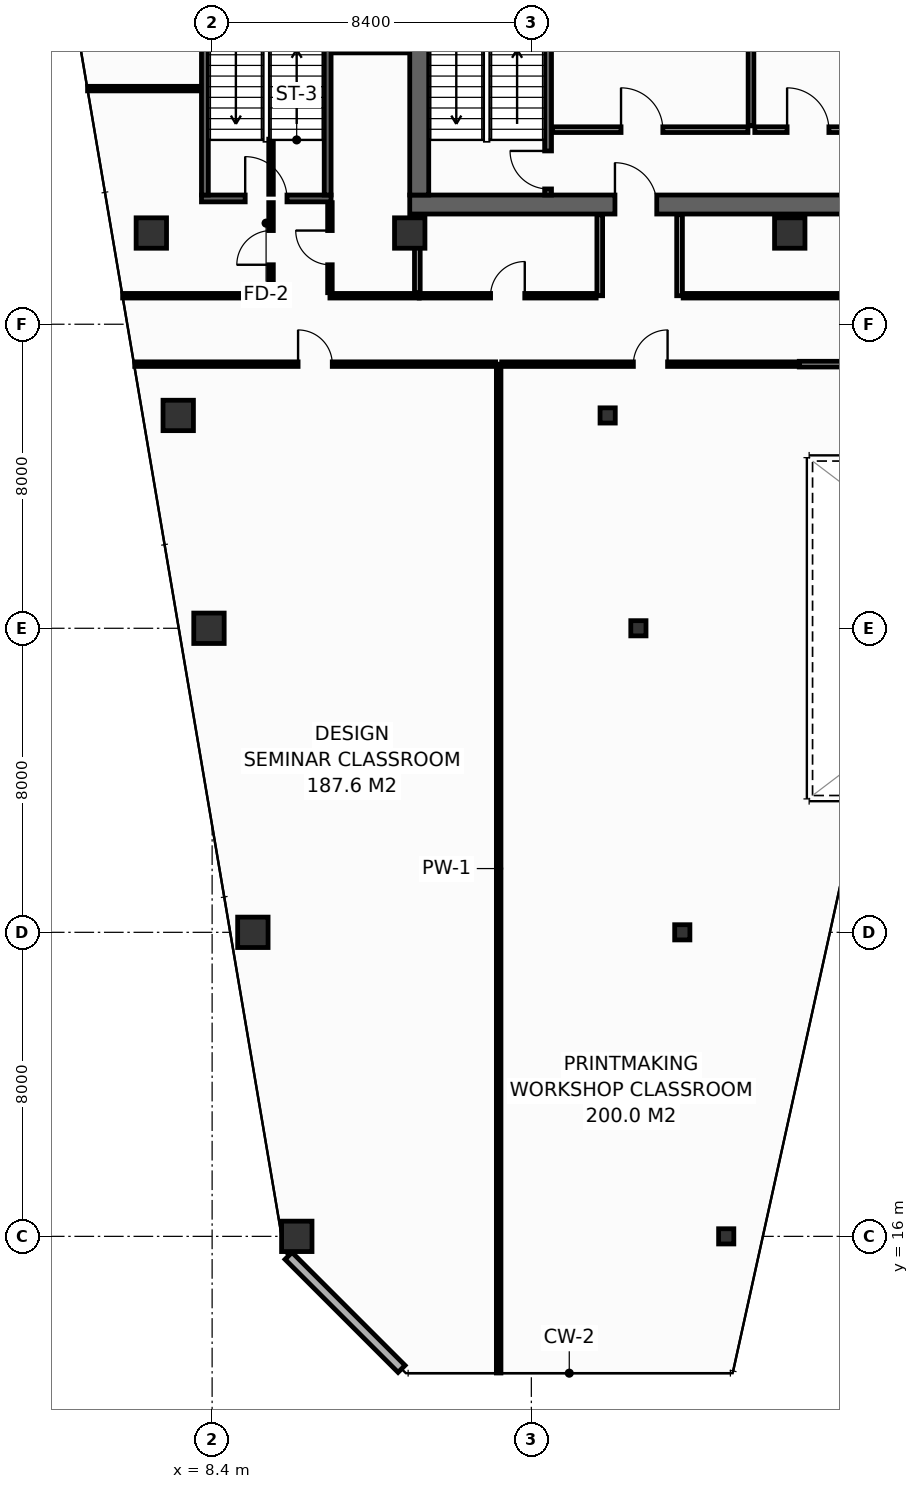
"""IFC4 building model, lengths in metres.
Left out: names, types, materials, properties, quantities, classifications, styles, units other than length and angle.
Written with IfcOpenShell. Run it as: python <this file> out.ifc"""

import sys

from ifc_helpers import new_model, si_unit, direction, frame, frame_2d, origin, origin_2d, place, context, subcontext, project, spatial, rectangle, hollow_rectangle, extrude, element, fill, save


model = new_model("IFC4")
c1 = context("Model", 3, precision=1e-05, world=origin(), true_north=direction((0.0, 1.0)))
c2 = subcontext(c1, "Body", "Model", "MODEL_VIEW")
j1 = project(units=[si_unit("LENGTHUNIT", "METRE"), si_unit("PLANEANGLEUNIT", "RADIAN")], contexts=[c1])
p1 = place(None, origin())
s1 = spatial("IfcSite", under=j1, at=p1, CompositionType="ELEMENT")
p2 = place(p1, origin())
s2 = spatial("IfcBuilding", under=s1, at=p2, CompositionType="ELEMENT")
p3 = place(p2, frame((0.0, 0.0, 217.0)))
s3 = spatial("IfcBuildingStorey", under=s2, at=p3, CompositionType="ELEMENT", Elevation=217.0)
p4 = place(p3, frame((13.6, 43.15, 0.0), z_axis=(0.0, 0.0, 1.0), x_axis=(1.0, 0.0, 0.0)))
e1 = element("IfcWall", 1, at=p4, inside=s3, PredefinedType="SHEAR", context=c2, shape_type="SweptSolid", body=[
    extrude(rectangle(XDim=32.7, YDim=0.5, at=frame_2d((16.35, 0.0))), origin(), (0.0, 0.0, 1.0), 3.55),
])
p5 = place(p4, frame((5.4, 0.0, 0.0)))
e2 = element("IfcOpeningElement", 2, at=p5, cuts=e1, PredefinedType="OPENING", context=c2, shape_type="SweptSolid", body=[
    extrude(rectangle(XDim=1.1, YDim=2.15, at=frame_2d((0.55, 1.075))), frame((0.0, 0.26, 0.0), z_axis=(0.0, -1.0, 0.0), x_axis=(1.0, 0.0, 0.0)), (0.0, 0.0, 1.0), 0.52),
])
p6 = place(p4, frame((25.6, 0.0, 0.0)))
e3 = element("IfcOpeningElement", 3, at=p6, cuts=e1, PredefinedType="OPENING", context=c2, shape_type="SweptSolid", body=[
    extrude(rectangle(XDim=1.1, YDim=2.15, at=frame_2d((0.55, 1.075))), frame((0.0, 0.26, 0.0), z_axis=(0.0, -1.0, 0.0), x_axis=(1.0, 0.0, 0.0)), (0.0, 0.0, 1.0), 0.52),
])
p7 = place(p3, frame((13.85, 43.4, 0.0), z_axis=(0.0, 0.0, 1.0), x_axis=(0.0, 1.0, 0.0)))
e4 = element("IfcWall", 4, at=p7, inside=s3, PredefinedType="SHEAR", context=c2, shape_type="SweptSolid", body=[
    extrude(rectangle(XDim=10.4, YDim=0.5, at=frame_2d((5.2, 0.0))), origin(), (0.0, 0.0, 1.0), 3.55),
])
for number, where, z_axis, x_axis in (
    (5, (6.8, 42.4, 0.0), (0.0, 0.0, 1.0), (1.0, 0.0, 0.0)),
    (6, (13.6, 42.4, 0.0), (0.0, 0.0, 1.0), (1.0, 0.0, 0.0)),
    (7, (23.6, 42.4, 0.0), (0.0, 0.0, 1.0), (1.0, 0.0, 0.0)),
    (8, (10.628, 16.0, 0.0), (0.0, 0.0, 1.0), (1.0, 0.0, 0.0)),
):
    element("IfcColumn", number, at=place(p3, frame(where, z_axis=z_axis, x_axis=x_axis)), inside=s3, PredefinedType="COLUMN", context=c2, shape_type="SweptSolid", body=[
        extrude(hollow_rectangle(XDim=0.8, YDim=0.8, WallThickness=0.036, at=origin_2d()), origin(), (0.0, 0.0, 1.0), 3.8),
    ])
p8 = place(p3, frame((21.928, 16.0, 0.0), z_axis=(0.0, 0.0, 1.0), x_axis=(1.0, 0.0, 0.0)))
e9 = element("IfcColumn", 9, at=p8, inside=s3, PredefinedType="COLUMN", context=c2, shape_type="SweptSolid", body=[
    extrude(hollow_rectangle(XDim=0.4, YDim=0.4, WallThickness=0.016, at=origin_2d()), origin(), (0.0, 0.0, 1.0), 3.8),
])
p9 = place(p3, frame((9.472, 24.0, 0.0), z_axis=(0.0, 0.0, 1.0), x_axis=(1.0, 0.0, 0.0)))
e10 = element("IfcColumn", 10, at=p9, inside=s3, PredefinedType="COLUMN", context=c2, shape_type="SweptSolid", body=[
    extrude(hollow_rectangle(XDim=0.8, YDim=0.8, WallThickness=0.036, at=origin_2d()), origin(), (0.0, 0.0, 1.0), 3.8),
])
p10 = place(p3, frame((20.772, 24.0, 0.0), z_axis=(0.0, 0.0, 1.0), x_axis=(1.0, 0.0, 0.0)))
e11 = element("IfcColumn", 11, at=p10, inside=s3, PredefinedType="COLUMN", context=c2, shape_type="SweptSolid", body=[
    extrude(hollow_rectangle(XDim=0.4, YDim=0.4, WallThickness=0.016, at=origin_2d()), origin(), (0.0, 0.0, 1.0), 3.8),
])
p11 = place(p3, frame((8.317, 32.0, 0.0), z_axis=(0.0, 0.0, 1.0), x_axis=(1.0, 0.0, 0.0)))
e12 = element("IfcColumn", 12, at=p11, inside=s3, PredefinedType="COLUMN", context=c2, shape_type="SweptSolid", body=[
    extrude(hollow_rectangle(XDim=0.8, YDim=0.8, WallThickness=0.036, at=origin_2d()), origin(), (0.0, 0.0, 1.0), 3.8),
])
p12 = place(p3, frame((19.617, 32.0, 0.0), z_axis=(0.0, 0.0, 1.0), x_axis=(1.0, 0.0, 0.0)))
e13 = element("IfcColumn", 13, at=p12, inside=s3, PredefinedType="COLUMN", context=c2, shape_type="SweptSolid", body=[
    extrude(hollow_rectangle(XDim=0.4, YDim=0.4, WallThickness=0.016, at=origin_2d()), origin(), (0.0, 0.0, 1.0), 3.8),
])
p13 = place(p3, frame((7.508, 37.6, 0.0), z_axis=(0.0, 0.0, 1.0), x_axis=(1.0, 0.0, 0.0)))
e14 = element("IfcColumn", 14, at=p13, inside=s3, PredefinedType="COLUMN", context=c2, shape_type="SweptSolid", body=[
    extrude(hollow_rectangle(XDim=0.8, YDim=0.8, WallThickness=0.036, at=origin_2d()), origin(), (0.0, 0.0, 1.0), 3.8),
])
p14 = place(p3, frame((18.808, 37.6, 0.0), z_axis=(0.0, 0.0, 1.0), x_axis=(1.0, 0.0, 0.0)))
e15 = element("IfcColumn", 15, at=p14, inside=s3, PredefinedType="COLUMN", context=c2, shape_type="SweptSolid", body=[
    extrude(hollow_rectangle(XDim=0.4, YDim=0.4, WallThickness=0.016, at=origin_2d()), origin(), (0.0, 0.0, 1.0), 3.8),
])
p15 = place(p3, frame((17.24, 43.4, 0.0), z_axis=(0.0, 0.0, 1.0), x_axis=(0.0, 1.0, 0.0)))
e16 = element("IfcWall", 16, at=p15, inside=s3, PredefinedType="SHEAR", context=c2, shape_type="SweptSolid", body=[
    extrude(rectangle(XDim=10.4, YDim=0.18, at=frame_2d((5.2, 0.0))), origin(), (0.0, 0.0, 1.0), 3.55),
])
p16 = place(p15, frame((0.16, 0.0, 0.0)))
e17 = element("IfcOpeningElement", 17, at=p16, cuts=e16, PredefinedType="OPENING", context=c2, shape_type="SweptSolid", body=[
    extrude(rectangle(XDim=1.0, YDim=2.15, at=frame_2d((0.5, 1.075))), frame((0.0, 0.1, 0.0), z_axis=(0.0, -1.0, 0.0), x_axis=(1.0, 0.0, 0.0)), (0.0, 0.0, 1.0), 0.2),
])
p17 = place(p3, frame((8.12, 43.31, 0.0), z_axis=(0.0, 0.0, 1.0), x_axis=(1.0, 0.0, 0.0)))
e18 = element("IfcWall", 18, at=p17, inside=s3, PredefinedType="SHEAR", context=c2, shape_type="SweptSolid", body=[
    extrude(rectangle(XDim=3.41, YDim=0.18, at=frame_2d((1.705, 0.0))), origin(), (0.0, 0.0, 1.0), 3.55),
])
p18 = place(p17, frame((1.15, 0.0, 0.0)))
e19 = element("IfcOpeningElement", 19, at=p18, cuts=e18, PredefinedType="OPENING", context=c2, shape_type="SweptSolid", body=[
    extrude(rectangle(XDim=1.1, YDim=2.15, at=frame_2d((0.55, 1.075))), frame((0.0, 0.1, 0.0), z_axis=(0.0, -1.0, 0.0), x_axis=(1.0, 0.0, 0.0)), (0.0, 0.0, 1.0), 0.2),
])
for number, where, z_axis, x_axis in (
    (20, (11.44, 43.4, 0.0), (0.0, 0.0, 1.0), (0.0, 1.0, 0.0)),
    (21, (8.21, 53.8, 0.0), (0.0, 0.0, 1.0), (0.0, -1.0, 0.0)),
):
    element("IfcWall", number, at=place(p3, frame(where, z_axis=z_axis, x_axis=x_axis)), inside=s3, PredefinedType="SHEAR", context=c2, shape_type="SweptSolid", body=[
        extrude(rectangle(XDim=10.4, YDim=0.18, at=frame_2d((5.2, 0.0))), origin(), (0.0, 0.0, 1.0), 3.55),
    ])
p19 = place(p3, frame((17.36, 45.12, 0.0), z_axis=(0.0, 0.0, 1.0), x_axis=(1.0, 0.0, 0.0)))
e22 = element("IfcWall", 22, at=p19, inside=s3, PredefinedType="PARTITIONING", context=c2, shape_type="SweptSolid", body=[
    extrude(rectangle(XDim=5.14, YDim=0.15, at=frame_2d((2.57, 0.0))), origin(), (0.0, 0.0, 1.0), 3.55),
])
p20 = place(p19, frame((1.8, 0.0, 0.0)))
e23 = element("IfcOpeningElement", 23, at=p20, cuts=e22, PredefinedType="OPENING", context=c2, shape_type="SweptSolid", body=[
    extrude(rectangle(XDim=1.1, YDim=2.15, at=frame_2d((0.55, 1.075))), frame((0.0, 0.085, 0.0), z_axis=(0.0, -1.0, 0.0), x_axis=(1.0, 0.0, 0.0)), (0.0, 0.0, 1.0), 0.17),
])
p21 = place(p3, frame((22.58, 50.55, 0.0), z_axis=(0.0, 0.0, 1.0), x_axis=(0.0, -1.0, 0.0)))
e24 = element("IfcWall", 24, at=p21, inside=s3, PredefinedType="PARTITIONING", context=c2, shape_type="SweptSolid", body=[
    extrude(rectangle(XDim=5.33, YDim=0.15, at=frame_2d((2.665, 0.0))), origin(), (0.0, 0.0, 1.0), 3.55),
])
p22 = place(p21, frame((1.8, 0.0, 0.0)))
e25 = element("IfcOpeningElement", 25, at=p22, cuts=e24, PredefinedType="OPENING", context=c2, shape_type="SweptSolid", body=[
    extrude(rectangle(XDim=1.1, YDim=2.15, at=frame_2d((0.55, 1.075))), frame((0.0, 0.085, 0.0), z_axis=(0.0, -1.0, 0.0), x_axis=(1.0, 0.0, 0.0)), (0.0, 0.0, 1.0), 0.17),
])
p23 = place(p3, frame((22.68, 45.12, 0.0), z_axis=(0.0, 0.0, 1.0), x_axis=(1.0, 0.0, 0.0)))
e26 = element("IfcWall", 26, at=p23, inside=s3, PredefinedType="PARTITIONING", context=c2, shape_type="SweptSolid", body=[
    extrude(rectangle(XDim=2.92, YDim=0.15, at=frame_2d((1.46, 0.0))), origin(), (0.0, 0.0, 1.0), 3.55),
])
p24 = place(p23, frame((0.85, 0.0, 0.0)))
e27 = element("IfcOpeningElement", 27, at=p24, cuts=e26, PredefinedType="OPENING", context=c2, shape_type="SweptSolid", body=[
    extrude(rectangle(XDim=1.1, YDim=2.15, at=frame_2d((0.55, 1.075))), frame((0.0, 0.085, 0.0), z_axis=(0.0, -1.0, 0.0), x_axis=(1.0, 0.0, 0.0)), (0.0, 0.0, 1.0), 0.17),
])
p25 = place(p3, frame((10.411, 15.487, 0.0), z_axis=(0.0, 0.0, 1.0), x_axis=(0.707135806771, -0.70707775441, 0.0)))
e28 = element("IfcWall", 28, at=p25, inside=s3, PredefinedType="STANDARD", context=c2, shape_type="SweptSolid", body=[
    extrude(rectangle(XDim=4.206, YDim=0.26, at=frame_2d((2.103, 0.0))), origin(), (0.0, 0.0, 1.0), 3.55),
])
p26 = place(p3, frame((6.045, 40.75, 0.0), z_axis=(0.0, 0.0, 1.0), x_axis=(1.0, 0.0, 0.0)))
e29 = element("IfcWall", 29, at=p26, inside=s3, PredefinedType="PARTITIONING", context=c2, shape_type="SweptSolid", body=[
    extrude(rectangle(XDim=3.905, YDim=0.12, at=frame_2d((1.952, 0.0))), origin(), (0.0, 0.0, 1.0), 3.035),
])
p27 = place(p3, frame((11.5, 40.75, 0.0), z_axis=(0.0, 0.0, 1.0), x_axis=(1.0, 0.0, 0.0)))
e30 = element("IfcWall", 30, at=p27, inside=s3, PredefinedType="PARTITIONING", context=c2, shape_type="SweptSolid", body=[
    extrude(rectangle(XDim=2.35, YDim=0.12, at=frame_2d((1.175, 0.0))), origin(), (0.0, 0.0, 1.0), 3.55),
])
p28 = place(p3, frame((5.122, 46.2, 0.0), z_axis=(0.0, 0.0, 1.0), x_axis=(1.0, 0.0, 0.0)))
e31 = element("IfcWall", 31, at=p28, inside=s3, PredefinedType="PARTITIONING", context=c2, shape_type="SweptSolid", body=[
    extrude(rectangle(XDim=2.978, YDim=0.12, at=frame_2d((1.489, 0.0))), origin(), (0.0, 0.0, 1.0), 2.835),
])
p29 = place(p3, frame((9.95, 40.83, 0.0), z_axis=(0.0, 0.0, 1.0), x_axis=(0.0, 1.0, 0.0)))
e32 = element("IfcWall", 32, at=p29, inside=s3, PredefinedType="PARTITIONING", context=c2, shape_type="SweptSolid", body=[
    extrude(rectangle(XDim=2.37, YDim=0.12, at=frame_2d((1.185, 0.0))), origin(), (0.0, 0.0, 1.0), 2.835),
])
p30 = place(p29, frame((0.735, 0.0, 0.0)))
e33 = element("IfcOpeningElement", 33, at=p30, cuts=e32, PredefinedType="OPENING", context=c2, shape_type="SweptSolid", body=[
    extrude(rectangle(XDim=0.9, YDim=2.1, at=frame_2d((0.45, 1.05))), frame((0.0, 0.07, 0.0), z_axis=(0.0, -1.0, 0.0), x_axis=(1.0, 0.0, 0.0)), (0.0, 0.0, 1.0), 0.14),
])
p31 = place(p3, frame((9.95, 43.42, 0.0), z_axis=(0.0, 0.0, 1.0), x_axis=(0.0, 1.0, 0.0)))
e34 = element("IfcWall", 34, at=p31, inside=s3, PredefinedType="PARTITIONING", context=c2, shape_type="SweptSolid", body=[
    extrude(rectangle(XDim=1.45, YDim=0.12, at=frame_2d((0.725, 0.0))), origin(), (0.0, 0.0, 1.0), 3.55),
])
p32 = place(p3, frame((11.55, 47.2, 0.0), z_axis=(0.0, 0.0, 1.0), x_axis=(1.0, 0.0, 0.0)))
e35 = element("IfcWall", 35, at=p32, inside=s3, PredefinedType="PARTITIONING", context=c2, shape_type="SweptSolid", body=[
    extrude(rectangle(XDim=2.03, YDim=0.12, at=frame_2d((1.015, 0.0))), origin(), (0.0, 0.0, 1.0), 3.55),
])
p33 = place(p3, frame((11.5, 40.83, 0.0), z_axis=(0.0, 0.0, 1.0), x_axis=(0.0, 1.0, 0.0)))
e36 = element("IfcWall", 36, at=p33, inside=s3, PredefinedType="PARTITIONING", context=c2, shape_type="SweptSolid", body=[
    extrude(rectangle(XDim=2.37, YDim=0.12, at=frame_2d((1.185, 0.0))), origin(), (0.0, 0.0, 1.0), 2.835),
])
p34 = place(p33, frame((0.735, 0.0, 0.0)))
e37 = element("IfcOpeningElement", 37, at=p34, cuts=e36, PredefinedType="OPENING", context=c2, shape_type="SweptSolid", body=[
    extrude(rectangle(XDim=0.9, YDim=2.1, at=frame_2d((0.45, 1.05))), frame((0.0, 0.07, 0.0), z_axis=(0.0, -1.0, 0.0), x_axis=(1.0, 0.0, 0.0)), (0.0, 0.0, 1.0), 0.14),
])
p35 = place(p3, frame((13.8, 40.83, 0.0), z_axis=(0.0, 0.0, 1.0), x_axis=(0.0, 1.0, 0.0)))
e38 = element("IfcWall", 38, at=p35, inside=s3, PredefinedType="PARTITIONING", context=c2, shape_type="SweptSolid", body=[
    extrude(rectangle(XDim=2.05, YDim=0.15, at=frame_2d((1.025, 0.0))), origin(), (0.0, 0.0, 1.0), 3.55),
])
for number, where, z_axis, x_axis in (
    (39, (18.6, 40.75, 0.0), (0.0, 0.0, 1.0), (0.0, 1.0, 0.0)),
    (40, (20.7, 40.75, 0.0), (0.0, 0.0, 1.0), (0.0, 1.0, 0.0)),
):
    element("IfcWall", number, at=place(p3, frame(where, z_axis=z_axis, x_axis=x_axis)), inside=s3, PredefinedType="PARTITIONING", context=c2, shape_type="SweptSolid", body=[
        extrude(rectangle(XDim=2.13, YDim=0.15, at=frame_2d((1.065, 0.0))), origin(), (0.0, 0.0, 1.0), 3.55),
    ])
p36 = place(p3, frame((13.85, 40.75, 0.0), z_axis=(0.0, 0.0, 1.0), x_axis=(1.0, 0.0, 0.0)))
e41 = element("IfcWall", 41, at=p36, inside=s3, PredefinedType="PARTITIONING", context=c2, shape_type="SweptSolid", body=[
    extrude(rectangle(XDim=4.655, YDim=0.12, at=frame_2d((2.327, 0.0))), origin(), (0.0, 0.0, 1.0), 3.55),
])
p37 = place(p36, frame((1.877, 0.0, 0.0)))
e42 = element("IfcOpeningElement", 42, at=p37, cuts=e41, PredefinedType="OPENING", context=c2, shape_type="SweptSolid", body=[
    extrude(rectangle(XDim=0.9, YDim=2.1, at=frame_2d((0.45, 1.05))), frame((0.0, 0.07, 0.0), z_axis=(0.0, -1.0, 0.0), x_axis=(1.0, 0.0, 0.0)), (0.0, 0.0, 1.0), 0.14),
])
p38 = place(p3, frame((20.795, 40.75, 0.0), z_axis=(0.0, 0.0, 1.0), x_axis=(1.0, 0.0, 0.0)))
e43 = element("IfcWall", 43, at=p38, inside=s3, PredefinedType="PARTITIONING", context=c2, shape_type="SweptSolid", body=[
    extrude(rectangle(XDim=17.91, YDim=0.12, at=frame_2d((8.955, 0.0))), origin(), (0.0, 0.0, 1.0), 2.835),
])
p39 = place(p38, frame((8.505, 0.0, 0.0)))
e44 = element("IfcOpeningElement", 44, at=p39, cuts=e43, PredefinedType="OPENING", context=c2, shape_type="SweptSolid", body=[
    extrude(rectangle(XDim=0.9, YDim=2.1, at=frame_2d((0.45, 1.05))), frame((0.0, 0.07, 0.0), z_axis=(0.0, -1.0, 0.0), x_axis=(1.0, 0.0, 0.0)), (0.0, 0.0, 1.0), 0.14),
])
p40 = place(p3, frame((15.94, 12.405, 0.0), z_axis=(0.0, 0.0, 1.0), x_axis=(0.0, 1.0, 0.0)))
e45 = element("IfcWall", 45, at=p40, inside=s3, PredefinedType="PARTITIONING", context=c2, shape_type="SweptSolid", body=[
    extrude(rectangle(XDim=26.545, YDim=0.12, at=frame_2d((13.272, 0.0))), origin(), (0.0, 0.0, 1.0), 2.835),
])
p41 = place(p3, frame((6.363, 38.95, 0.0), z_axis=(0.0, 0.0, 1.0), x_axis=(1.0, 0.0, 0.0)))
e46 = element("IfcWall", 46, at=p41, inside=s3, PredefinedType="PARTITIONING", context=c2, shape_type="SweptSolid", body=[
    extrude(rectangle(XDim=9.497, YDim=0.12, at=frame_2d((4.749, 0.0))), origin(), (0.0, 0.0, 1.0), 3.035),
])
p42 = place(p41, frame((4.299, 0.0, 0.0)))
e47 = element("IfcOpeningElement", 47, at=p42, cuts=e46, PredefinedType="OPENING", context=c2, shape_type="SweptSolid", body=[
    extrude(rectangle(XDim=0.9, YDim=2.1, at=frame_2d((0.45, 1.05))), frame((0.0, 0.07, 0.0), z_axis=(0.0, -1.0, 0.0), x_axis=(1.0, 0.0, 0.0)), (0.0, 0.0, 1.0), 0.14),
])
p43 = place(p3, frame((16.02, 38.95, 0.0), z_axis=(0.0, 0.0, 1.0), x_axis=(1.0, 0.0, 0.0)))
e48 = element("IfcWall", 48, at=p43, inside=s3, PredefinedType="PARTITIONING", context=c2, shape_type="SweptSolid", body=[
    extrude(rectangle(XDim=7.83, YDim=0.12, at=frame_2d((3.915, 0.0))), origin(), (0.0, 0.0, 1.0), 2.835),
])
p44 = place(p43, frame((3.465, 0.0, 0.0)))
e49 = element("IfcOpeningElement", 49, at=p44, cuts=e48, PredefinedType="OPENING", context=c2, shape_type="SweptSolid", body=[
    extrude(rectangle(XDim=0.9, YDim=2.1, at=frame_2d((0.45, 1.05))), frame((0.0, 0.07, 0.0), z_axis=(0.0, -1.0, 0.0), x_axis=(1.0, 0.0, 0.0)), (0.0, 0.0, 1.0), 0.14),
])
p45 = place(p3, frame((23.85, 38.95, 0.0), z_axis=(0.0, 0.0, 1.0), x_axis=(1.0, 0.0, 0.0)))
e50 = element("IfcWall", 50, at=p45, inside=s3, PredefinedType="PARTITIONING", context=c2, shape_type="SweptSolid", body=[
    extrude(rectangle(XDim=12.3, YDim=0.15, at=frame_2d((6.15, 0.0))), origin(), (0.0, 0.0, 1.0), 3.55),
])
p46 = place(p16, origin())
e51 = element("IfcDoor", 51, at=p46, inside=s3, OperationType="SINGLE_SWING_RIGHT", PredefinedType="DOOR", context=c2, shape_type="SweptSolid", body=[
    extrude(rectangle(XDim=1.0, YDim=2.15, at=frame_2d((0.5, 1.075))), frame((0.0, 0.025, 0.0), z_axis=(0.0, -1.0, 0.0), x_axis=(1.0, 0.0, 0.0)), (0.0, 0.0, 1.0), 0.05),
])
fill(e17, e51)
p47 = place(p18, origin())
e52 = element("IfcDoor", 52, at=p47, inside=s3, OperationType="SINGLE_SWING_LEFT", PredefinedType="DOOR", context=c2, shape_type="SweptSolid", body=[
    extrude(rectangle(XDim=1.1, YDim=2.15, at=frame_2d((0.55, 1.075))), frame((0.0, 0.025, 0.0), z_axis=(0.0, -1.0, 0.0), x_axis=(1.0, 0.0, 0.0)), (0.0, 0.0, 1.0), 0.05),
])
fill(e19, e52)
p48 = place(p20, origin())
e53 = element("IfcDoor", 53, at=p48, inside=s3, OperationType="SINGLE_SWING_LEFT", PredefinedType="DOOR", context=c2, shape_type="SweptSolid", body=[
    extrude(rectangle(XDim=1.1, YDim=2.15, at=frame_2d((0.55, 1.075))), frame((0.0, 0.025, 0.0), z_axis=(0.0, -1.0, 0.0), x_axis=(1.0, 0.0, 0.0)), (0.0, 0.0, 1.0), 0.05),
])
fill(e23, e53)
p49 = place(p24, origin())
e54 = element("IfcDoor", 54, at=p49, inside=s3, OperationType="SINGLE_SWING_LEFT", PredefinedType="DOOR", context=c2, shape_type="SweptSolid", body=[
    extrude(rectangle(XDim=1.1, YDim=2.15, at=frame_2d((0.55, 1.075))), frame((0.0, 0.025, 0.0), z_axis=(0.0, -1.0, 0.0), x_axis=(1.0, 0.0, 0.0)), (0.0, 0.0, 1.0), 0.05),
])
fill(e27, e54)
p50 = place(p5, origin())
e55 = element("IfcDoor", 55, at=p50, inside=s3, OperationType="SINGLE_SWING_LEFT", PredefinedType="DOOR", context=c2, shape_type="SweptSolid", body=[
    extrude(rectangle(XDim=1.1, YDim=2.15, at=frame_2d((0.55, 1.075))), frame((0.0, 0.025, 0.0), z_axis=(0.0, -1.0, 0.0), x_axis=(1.0, 0.0, 0.0)), (0.0, 0.0, 1.0), 0.05),
])
fill(e2, e55)
p51 = place(p30, origin())
e56 = element("IfcDoor", 56, at=p51, inside=s3, OperationType="SINGLE_SWING_LEFT", PredefinedType="DOOR", context=c2, shape_type="SweptSolid", body=[
    extrude(rectangle(XDim=0.9, YDim=2.1, at=frame_2d((0.45, 1.05))), frame((0.0, 0.025, 0.0), z_axis=(0.0, -1.0, 0.0), x_axis=(1.0, 0.0, 0.0)), (0.0, 0.0, 1.0), 0.05),
])
fill(e33, e56)
p52 = place(p34, origin())
e57 = element("IfcDoor", 57, at=p52, inside=s3, OperationType="SINGLE_SWING_RIGHT", PredefinedType="DOOR", context=c2, shape_type="SweptSolid", body=[
    extrude(rectangle(XDim=0.9, YDim=2.1, at=frame_2d((0.45, 1.05))), frame((0.0, 0.025, 0.0), z_axis=(0.0, -1.0, 0.0), x_axis=(1.0, 0.0, 0.0)), (0.0, 0.0, 1.0), 0.05),
])
fill(e37, e57)
p53 = place(p37, origin())
e58 = element("IfcDoor", 58, at=p53, inside=s3, OperationType="SINGLE_SWING_RIGHT", PredefinedType="DOOR", context=c2, shape_type="SweptSolid", body=[
    extrude(rectangle(XDim=0.9, YDim=2.1, at=frame_2d((0.45, 1.05))), frame((0.0, 0.025, 0.0), z_axis=(0.0, -1.0, 0.0), x_axis=(1.0, 0.0, 0.0)), (0.0, 0.0, 1.0), 0.05),
])
fill(e42, e58)
p54 = place(p42, origin())
e59 = element("IfcDoor", 59, at=p54, inside=s3, OperationType="SINGLE_SWING_LEFT", PredefinedType="DOOR", context=c2, shape_type="SweptSolid", body=[
    extrude(rectangle(XDim=0.9, YDim=2.1, at=frame_2d((0.45, 1.05))), frame((0.0, 0.025, 0.0), z_axis=(0.0, -1.0, 0.0), x_axis=(1.0, 0.0, 0.0)), (0.0, 0.0, 1.0), 0.05),
])
fill(e47, e59)
p55 = place(p44, origin())
e60 = element("IfcDoor", 60, at=p55, inside=s3, OperationType="SINGLE_SWING_RIGHT", PredefinedType="DOOR", context=c2, shape_type="SweptSolid", body=[
    extrude(rectangle(XDim=0.9, YDim=2.1, at=frame_2d((0.45, 1.05))), frame((0.0, 0.025, 0.0), z_axis=(0.0, -1.0, 0.0), x_axis=(1.0, 0.0, 0.0)), (0.0, 0.0, 1.0), 0.05),
])
fill(e49, e60)
save(model, sys.argv[1])
